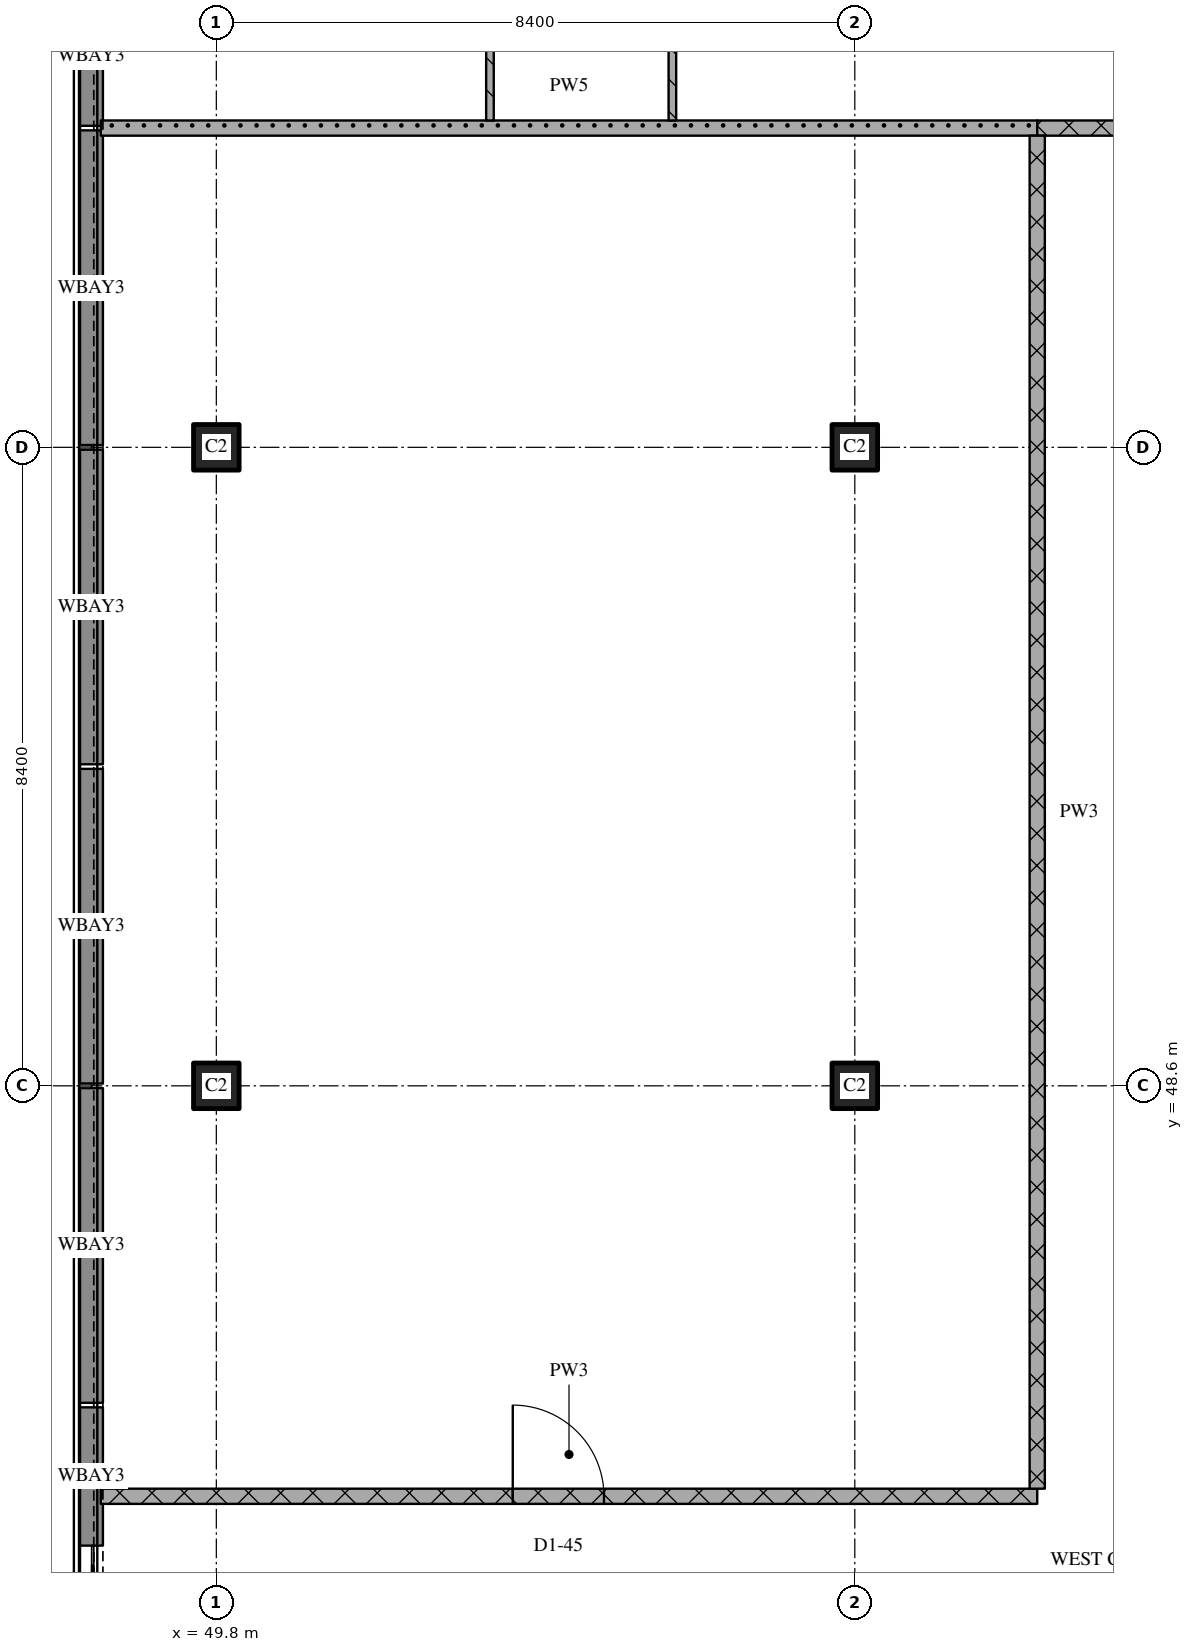
"""IFC4 building model, lengths in metres.
Left out: names, types, materials, properties, quantities, classifications, styles, units other than length and angle.
Written with IfcOpenShell. Run it as: python <this file> out.ifc"""

import sys

from ifc_helpers import new_model, si_unit, direction, frame, frame_2d, origin, origin_2d, place, context, subcontext, project, spatial, rectangle, extrude, element, fill, save


model = new_model("IFC4")
c1 = context("Model", 3, precision=1e-05, world=origin(), true_north=direction((0.0, 1.0)))
c2 = subcontext(c1, "Body", "Model", "MODEL_VIEW")
j1 = project(units=[si_unit("LENGTHUNIT", "METRE"), si_unit("PLANEANGLEUNIT", "RADIAN")], contexts=[c1])
p1 = place(None, origin())
s1 = spatial("IfcSite", under=j1, at=p1, CompositionType="ELEMENT")
p2 = place(p1, origin())
s2 = spatial("IfcBuilding", under=s1, at=p2, CompositionType="ELEMENT")
p3 = place(p2, frame((0.0, 0.0, 205.5)))
s3 = spatial("IfcBuildingStorey", under=s2, at=p3, CompositionType="ELEMENT", Elevation=205.5)
for number, where, z_axis, x_axis in (
    (1, (49.8, 48.6, 0.0), (0.0, 0.0, 1.0), (1.0, 0.0, 0.0)),
    (2, (49.8, 57.0, 0.0), (0.0, 0.0, 1.0), (1.0, 0.0, 0.0)),
    (3, (58.2, 48.6, 0.0), (0.0, 0.0, 1.0), (1.0, 0.0, 0.0)),
    (4, (58.2, 57.0, 0.0), (0.0, 0.0, 1.0), (1.0, 0.0, 0.0)),
):
    element("IfcColumn", number, at=place(p3, frame(where, z_axis=z_axis, x_axis=x_axis)), inside=s3, PredefinedType="COLUMN", context=c2, shape_type="SweptSolid", body=[
        extrude(rectangle(XDim=0.6, YDim=0.6, at=origin_2d()), origin(), (0.0, 0.0, 1.0), 3.6),
    ])
p4 = place(p3, frame((48.154, 61.23, 0.0), z_axis=(0.0, 0.0, 1.0), x_axis=(0.0, 1.0, 0.0)))
e5 = element("IfcWall", 5, at=p4, inside=s3, PredefinedType="SOLIDWALL", context=c2, shape_type="SweptSolid", body=[
    extrude(rectangle(XDim=1.819, YDim=0.308, at=frame_2d((0.91, 0.0))), origin(), (0.0, 0.0, 1.0), 3.2),
])
for number, where, z_axis, x_axis in (
    (6, (48.154, 57.03, 0.0), (0.0, 0.0, 1.0), (0.0, 1.0, 0.0)),
    (7, (48.154, 52.83, 0.0), (0.0, 0.0, 1.0), (0.0, 1.0, 0.0)),
):
    element("IfcWall", number, at=place(p3, frame(where, z_axis=z_axis, x_axis=x_axis)), inside=s3, PredefinedType="SOLIDWALL", context=c2, shape_type="SweptSolid", body=[
        extrude(rectangle(XDim=4.14, YDim=0.308, at=frame_2d((2.07, 0.0))), origin(), (0.0, 0.0, 1.0), 3.2),
    ])
for number, where, z_axis, x_axis in (
    (8, (48.154, 48.63, 0.0), (0.0, 0.0, 1.0), (0.0, 1.0, 0.0)),
    (9, (48.154, 44.43, 0.0), (0.0, 0.0, 1.0), (0.0, 1.0, 0.0)),
):
    element("IfcWall", number, at=place(p3, frame(where, z_axis=z_axis, x_axis=x_axis)), inside=s3, PredefinedType="SOLIDWALL", context=c2, shape_type="SweptSolid", body=[
        extrude(rectangle(XDim=4.14, YDim=0.308, at=frame_2d((2.07, 0.0))), origin(), (0.0, 0.0, 1.0), 3.2),
    ])
p5 = place(p3, frame((48.154, 42.551, 0.0), z_axis=(0.0, 0.0, 1.0), x_axis=(0.0, 1.0, 0.0)))
e10 = element("IfcWall", 10, at=p5, inside=s3, PredefinedType="SOLIDWALL", context=c2, shape_type="SweptSolid", body=[
    extrude(rectangle(XDim=1.819, YDim=0.308, at=frame_2d((0.91, 0.0))), origin(), (0.0, 0.0, 1.0), 3.2),
])
p6 = place(p3, frame((48.28, 43.2, 0.0), z_axis=(0.0, 0.0, 1.0), x_axis=(1.0, 0.0, 0.0)))
e11 = element("IfcWall", 11, at=p6, inside=s3, PredefinedType="PARTITIONING", context=c2, shape_type="SweptSolid", body=[
    extrude(rectangle(XDim=12.32, YDim=0.2, at=frame_2d((6.16, 0.0))), origin(), (0.0, 0.0, 1.0), 3.32),
])
p7 = place(p6, frame((5.42, 0.0, 0.0)))
e12 = element("IfcOpeningElement", 12, at=p7, cuts=e11, PredefinedType="OPENING", context=c2, shape_type="SweptSolid", body=[
    extrude(rectangle(XDim=1.2, YDim=2.1, at=frame_2d((0.6, 1.05))), frame((0.0, 0.11, 0.0), z_axis=(0.0, -1.0, 0.0), x_axis=(1.0, 0.0, 0.0)), (0.0, 0.0, 1.0), 0.22),
])
p8 = place(p3, frame((60.6, 61.2, 0.0), z_axis=(0.0, 0.0, 1.0), x_axis=(1.0, 0.0, 0.0)))
e13 = element("IfcWall", 13, at=p8, inside=s3, PredefinedType="PARTITIONING", context=c2, shape_type="SweptSolid", body=[
    extrude(rectangle(XDim=3.6, YDim=0.2, at=frame_2d((1.8, 0.0))), origin(), (0.0, 0.0, 1.0), 3.32),
])
p9 = place(p3, frame((48.28, 61.2, 0.0), z_axis=(0.0, 0.0, 1.0), x_axis=(1.0, 0.0, 0.0)))
e14 = element("IfcWall", 14, at=p9, inside=s3, PredefinedType="PARTITIONING", context=c2, shape_type="SweptSolid", body=[
    extrude(rectangle(XDim=12.32, YDim=0.2, at=frame_2d((6.16, 0.0))), origin(), (0.0, 0.0, 1.0), 3.32),
])
p10 = place(p3, frame((53.4, 69.55, 0.0), z_axis=(0.0, 0.0, 1.0), x_axis=(0.0, -1.0, 0.0)))
e15 = element("IfcWall", 15, at=p10, inside=s3, PredefinedType="PARTITIONING", context=c2, shape_type="SweptSolid", body=[
    extrude(rectangle(XDim=8.25, YDim=0.1, at=frame_2d((4.125, 0.0))), origin(), (0.0, 0.0, 1.0), 3.32),
])
p11 = place(p3, frame((55.8, 67.15, 0.0), z_axis=(0.0, 0.0, 1.0), x_axis=(0.0, -1.0, 0.0)))
e16 = element("IfcWall", 16, at=p11, inside=s3, PredefinedType="PARTITIONING", context=c2, shape_type="SweptSolid", body=[
    extrude(rectangle(XDim=5.85, YDim=0.1, at=frame_2d((2.925, 0.0))), origin(), (0.0, 0.0, 1.0), 3.32),
])
p12 = place(p11, frame((3.973, 0.0, 0.0)))
e17 = element("IfcOpeningElement", 17, at=p12, cuts=e16, PredefinedType="OPENING", context=c2, shape_type="SweptSolid", body=[
    extrude(rectangle(XDim=0.8, YDim=2.1, at=frame_2d((0.4, 1.05))), frame((0.0, 0.06, 0.0), z_axis=(0.0, -1.0, 0.0), x_axis=(1.0, 0.0, 0.0)), (0.0, 0.0, 1.0), 0.12),
])
p13 = place(p3, frame((60.6, 61.1, 0.0), z_axis=(0.0, 0.0, 1.0), x_axis=(0.0, -1.0, 0.0)))
e18 = element("IfcWall", 18, at=p13, inside=s3, PredefinedType="PARTITIONING", context=c2, shape_type="SweptSolid", body=[
    extrude(rectangle(XDim=17.8, YDim=0.2, at=frame_2d((8.9, 0.0))), origin(), (0.0, 0.0, 1.0), 3.32),
])
p14 = place(p7, origin())
e19 = element("IfcDoor", 19, at=p14, inside=s3, OperationType="SINGLE_SWING_LEFT", PredefinedType="DOOR", context=c2, shape_type="SweptSolid", body=[
    extrude(rectangle(XDim=1.2, YDim=2.1, at=frame_2d((0.6, 1.05))), frame((0.0, 0.025, 0.0), z_axis=(0.0, -1.0, 0.0), x_axis=(1.0, 0.0, 0.0)), (0.0, 0.0, 1.0), 0.05),
])
fill(e12, e19)
save(model, sys.argv[1])
